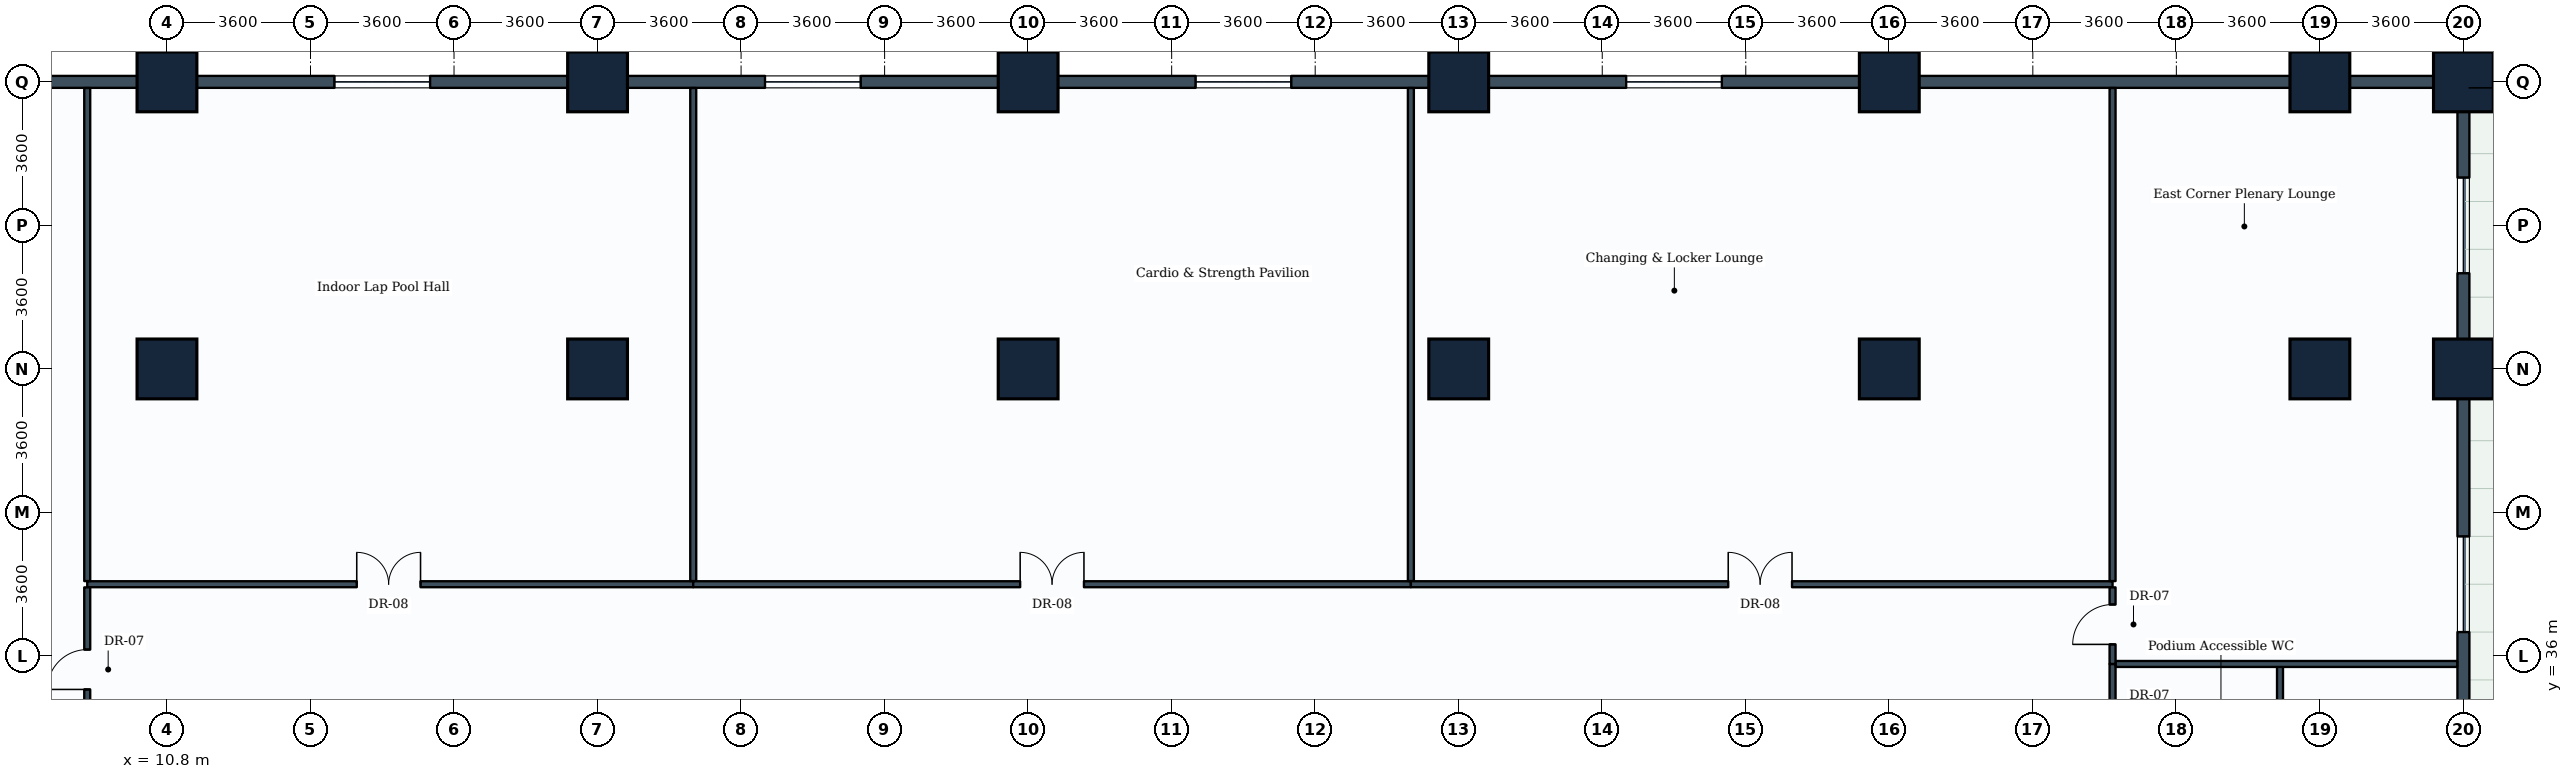
"""IFC4 building model, lengths in metres.
Left out: names, types, materials, properties, quantities, classifications, styles, units other than length and angle.
Written with IfcOpenShell. Run it as: python <this file> out.ifc"""

import sys

from ifc_helpers import new_model, si_unit, direction, frame, frame_2d, origin, origin_2d, place, context, subcontext, project, spatial, rectangle, extrude, element, fill, save


model = new_model("IFC4")
c1 = context("Model", 3, precision=1e-05, world=origin(), true_north=direction((0.0, 1.0)))
c2 = subcontext(c1, "Body", "Model", "MODEL_VIEW")
j1 = project(units=[si_unit("LENGTHUNIT", "METRE"), si_unit("PLANEANGLEUNIT", "RADIAN")], contexts=[c1])
p1 = place(None, origin())
s1 = spatial("IfcSite", under=j1, at=p1, CompositionType="ELEMENT")
p2 = place(p1, origin())
s2 = spatial("IfcBuilding", under=s1, at=p2, CompositionType="ELEMENT")
p3 = place(p2, frame((0.0, 0.0, 19.4)))
s3 = spatial("IfcBuildingStorey", under=s2, at=p3, CompositionType="ELEMENT", Elevation=19.4)
for number, where, z_axis, x_axis in (
    (1, (10.8, 43.2, 0.0), (0.0, 0.0, 1.0), (1.0, 0.0, 0.0)),
    (2, (10.8, 50.4, 0.0), (0.0, 0.0, 1.0), (1.0, 0.0, 0.0)),
    (3, (21.6, 43.2, 0.0), (0.0, 0.0, 1.0), (1.0, 0.0, 0.0)),
    (4, (21.6, 50.4, 0.0), (0.0, 0.0, 1.0), (1.0, 0.0, 0.0)),
    (5, (32.4, 43.2, 0.0), (0.0, 0.0, 1.0), (1.0, 0.0, 0.0)),
    (6, (32.4, 50.4, 0.0), (0.0, 0.0, 1.0), (1.0, 0.0, 0.0)),
    (7, (43.2, 43.2, 0.0), (0.0, 0.0, 1.0), (1.0, 0.0, 0.0)),
    (8, (43.2, 50.4, 0.0), (0.0, 0.0, 1.0), (1.0, 0.0, 0.0)),
    (9, (54.0, 43.2, 0.0), (0.0, 0.0, 1.0), (1.0, 0.0, 0.0)),
    (10, (54.0, 50.4, 0.0), (0.0, 0.0, 1.0), (1.0, 0.0, 0.0)),
    (11, (64.8, 43.2, 0.0), (0.0, 0.0, 1.0), (1.0, 0.0, 0.0)),
    (12, (64.8, 50.4, 0.0), (0.0, 0.0, 1.0), (1.0, 0.0, 0.0)),
    (13, (68.4, 43.2, 0.0), (0.0, 0.0, 1.0), (1.0, 0.0, 0.0)),
    (14, (68.4, 50.4, 0.0), (0.0, 0.0, 1.0), (1.0, 0.0, 0.0)),
):
    element("IfcColumn", number, at=place(p3, frame(where, z_axis=z_axis, x_axis=x_axis)), inside=s3, PredefinedType="COLUMN", context=c2, shape_type="SweptSolid", body=[
        extrude(rectangle(XDim=1.5, YDim=1.5, at=origin_2d()), origin(), (0.0, 0.0, 1.0), 4.6),
    ])
p4 = place(p3, frame((68.4, 43.2, 0.0), z_axis=(0.0, 0.0, 1.0), x_axis=(0.0, -1.0, 0.0)))
e15 = element("IfcWall", 15, at=p4, inside=s3, PredefinedType="STANDARD", context=c2, shape_type="SweptSolid", body=[
    extrude(rectangle(XDim=10.8, YDim=0.3, at=frame_2d((5.4, 0.0))), origin(), (0.0, 0.0, 1.0), 4.185),
])
p5 = place(p4, frame((4.2, 0.0, 0.85)))
e16 = element("IfcOpeningElement", 16, at=p5, cuts=e15, PredefinedType="OPENING", context=c2, shape_type="SweptSolid", body=[
    extrude(rectangle(XDim=2.4, YDim=1.6, at=frame_2d((1.2, 0.8))), frame((0.0, 0.16, 0.0), z_axis=(0.0, -1.0, 0.0), x_axis=(1.0, 0.0, 0.0)), (0.0, 0.0, 1.0), 0.32),
])
p6 = place(p3, frame((68.4, 50.4, 0.0), z_axis=(0.0, 0.0, 1.0), x_axis=(0.0, -1.0, 0.0)))
e17 = element("IfcWall", 17, at=p6, inside=s3, PredefinedType="STANDARD", context=c2, shape_type="SweptSolid", body=[
    extrude(rectangle(XDim=7.2, YDim=0.3, at=frame_2d((3.6, 0.0))), origin(), (0.0, 0.0, 1.0), 4.185),
])
p7 = place(p6, frame((2.4, 0.0, 0.85)))
e18 = element("IfcOpeningElement", 18, at=p7, cuts=e17, PredefinedType="OPENING", context=c2, shape_type="SweptSolid", body=[
    extrude(rectangle(XDim=2.4, YDim=1.6, at=frame_2d((1.2, 0.8))), frame((0.0, 0.16, 0.0), z_axis=(0.0, -1.0, 0.0), x_axis=(1.0, 0.0, 0.0)), (0.0, 0.0, 1.0), 0.32),
])
p8 = place(p3, frame((0.0, 50.4, 0.0), z_axis=(0.0, 0.0, 1.0), x_axis=(1.0, 0.0, 0.0)))
e19 = element("IfcWall", 19, at=p8, inside=s3, PredefinedType="STANDARD", context=c2, shape_type="SweptSolid", body=[
    extrude(rectangle(XDim=10.8, YDim=0.3, at=frame_2d((5.4, 0.0))), origin(), (0.0, 0.0, 1.0), 3.23),
])
p9 = place(p8, frame((4.2, 0.0, 0.85)))
e20 = element("IfcOpeningElement", 20, at=p9, cuts=e19, PredefinedType="OPENING", context=c2, shape_type="SweptSolid", body=[
    extrude(rectangle(XDim=2.4, YDim=1.6, at=frame_2d((1.2, 0.8))), frame((0.0, 0.16, 0.0), z_axis=(0.0, -1.0, 0.0), x_axis=(1.0, 0.0, 0.0)), (0.0, 0.0, 1.0), 0.32),
])
p10 = place(p3, frame((10.8, 50.4, 0.0), z_axis=(0.0, 0.0, 1.0), x_axis=(1.0, 0.0, 0.0)))
e21 = element("IfcWall", 21, at=p10, inside=s3, PredefinedType="STANDARD", context=c2, shape_type="SweptSolid", body=[
    extrude(rectangle(XDim=10.8, YDim=0.3, at=frame_2d((5.4, 0.0))), origin(), (0.0, 0.0, 1.0), 3.23),
])
p11 = place(p10, frame((4.2, 0.0, 0.85)))
e22 = element("IfcOpeningElement", 22, at=p11, cuts=e21, PredefinedType="OPENING", context=c2, shape_type="SweptSolid", body=[
    extrude(rectangle(XDim=2.4, YDim=1.6, at=frame_2d((1.2, 0.8))), frame((0.0, 0.16, 0.0), z_axis=(0.0, -1.0, 0.0), x_axis=(1.0, 0.0, 0.0)), (0.0, 0.0, 1.0), 0.32),
])
p12 = place(p3, frame((21.6, 50.4, 0.0), z_axis=(0.0, 0.0, 1.0), x_axis=(1.0, 0.0, 0.0)))
e23 = element("IfcWall", 23, at=p12, inside=s3, PredefinedType="STANDARD", context=c2, shape_type="SweptSolid", body=[
    extrude(rectangle(XDim=10.8, YDim=0.3, at=frame_2d((5.4, 0.0))), origin(), (0.0, 0.0, 1.0), 3.23),
])
p13 = place(p12, frame((4.2, 0.0, 0.85)))
e24 = element("IfcOpeningElement", 24, at=p13, cuts=e23, PredefinedType="OPENING", context=c2, shape_type="SweptSolid", body=[
    extrude(rectangle(XDim=2.4, YDim=1.6, at=frame_2d((1.2, 0.8))), frame((0.0, 0.16, 0.0), z_axis=(0.0, -1.0, 0.0), x_axis=(1.0, 0.0, 0.0)), (0.0, 0.0, 1.0), 0.32),
])
p14 = place(p3, frame((32.4, 50.4, 0.0), z_axis=(0.0, 0.0, 1.0), x_axis=(1.0, 0.0, 0.0)))
e25 = element("IfcWall", 25, at=p14, inside=s3, PredefinedType="STANDARD", context=c2, shape_type="SweptSolid", body=[
    extrude(rectangle(XDim=10.8, YDim=0.3, at=frame_2d((5.4, 0.0))), origin(), (0.0, 0.0, 1.0), 3.23),
])
p15 = place(p14, frame((4.2, 0.0, 0.85)))
e26 = element("IfcOpeningElement", 26, at=p15, cuts=e25, PredefinedType="OPENING", context=c2, shape_type="SweptSolid", body=[
    extrude(rectangle(XDim=2.4, YDim=1.6, at=frame_2d((1.2, 0.8))), frame((0.0, 0.16, 0.0), z_axis=(0.0, -1.0, 0.0), x_axis=(1.0, 0.0, 0.0)), (0.0, 0.0, 1.0), 0.32),
])
p16 = place(p3, frame((43.2, 50.4, 0.0), z_axis=(0.0, 0.0, 1.0), x_axis=(1.0, 0.0, 0.0)))
e27 = element("IfcWall", 27, at=p16, inside=s3, PredefinedType="STANDARD", context=c2, shape_type="SweptSolid", body=[
    extrude(rectangle(XDim=10.8, YDim=0.3, at=frame_2d((5.4, 0.0))), origin(), (0.0, 0.0, 1.0), 4.185),
])
p17 = place(p16, frame((4.2, 0.0, 0.85)))
e28 = element("IfcOpeningElement", 28, at=p17, cuts=e27, PredefinedType="OPENING", context=c2, shape_type="SweptSolid", body=[
    extrude(rectangle(XDim=2.4, YDim=1.6, at=frame_2d((1.2, 0.8))), frame((0.0, 0.16, 0.0), z_axis=(0.0, -1.0, 0.0), x_axis=(1.0, 0.0, 0.0)), (0.0, 0.0, 1.0), 0.32),
])
p18 = place(p3, frame((54.0, 50.4, 0.0), z_axis=(0.0, 0.0, 1.0), x_axis=(1.0, 0.0, 0.0)))
e29 = element("IfcWall", 29, at=p18, inside=s3, PredefinedType="STANDARD", context=c2, shape_type="SweptSolid", body=[
    extrude(rectangle(XDim=10.8, YDim=0.3, at=frame_2d((5.4, 0.0))), origin(), (0.0, 0.0, 1.0), 4.185),
])
p19 = place(p3, frame((64.8, 50.4, 0.0), z_axis=(0.0, 0.0, 1.0), x_axis=(1.0, 0.0, 0.0)))
e30 = element("IfcWall", 30, at=p19, inside=s3, PredefinedType="STANDARD", context=c2, shape_type="SweptSolid", body=[
    extrude(rectangle(XDim=3.6, YDim=0.3, at=frame_2d((1.8, 0.0))), origin(), (0.0, 0.0, 1.0), 4.185),
])
p20 = place(p3, frame((8.8, 37.8, 0.0), z_axis=(0.0, 0.0, 1.0), x_axis=(1.0, 0.0, 0.0)))
e31 = element("IfcWall", 31, at=p20, inside=s3, PredefinedType="PARTITIONING", context=c2, shape_type="SweptSolid", body=[
    extrude(rectangle(XDim=15.2, YDim=0.15, at=frame_2d((7.6, 0.0))), origin(), (0.0, 0.0, 1.0), 3.23),
])
p21 = place(p20, frame((6.76, 0.0, 0.0)))
e32 = element("IfcOpeningElement", 32, at=p21, cuts=e31, PredefinedType="OPENING", context=c2, shape_type="SweptSolid", body=[
    extrude(rectangle(XDim=1.6, YDim=2.2, at=frame_2d((0.8, 1.1))), frame((0.0, 0.085, 0.0), z_axis=(0.0, -1.0, 0.0), x_axis=(1.0, 0.0, 0.0)), (0.0, 0.0, 1.0), 0.17),
])
p22 = place(p3, frame((24.0, 37.879, 0.0), z_axis=(0.0, 0.0, 1.0), x_axis=(0.0, 1.0, 0.0)))
e33 = element("IfcWall", 33, at=p22, inside=s3, PredefinedType="PARTITIONING", context=c2, shape_type="SweptSolid", body=[
    extrude(rectangle(XDim=12.367, YDim=0.15, at=frame_2d((6.184, 0.0))), origin(), (0.0, 0.0, 1.0), 3.23),
])
p23 = place(p3, frame((24.0, 37.8, 0.0), z_axis=(0.0, 0.0, 1.0), x_axis=(1.0, 0.0, 0.0)))
e34 = element("IfcWall", 34, at=p23, inside=s3, PredefinedType="PARTITIONING", context=c2, shape_type="SweptSolid", body=[
    extrude(rectangle(XDim=18.0, YDim=0.15, at=frame_2d((9.0, 0.0))), origin(), (0.0, 0.0, 1.0), 3.23),
])
p24 = place(p23, frame((8.2, 0.0, 0.0)))
e35 = element("IfcOpeningElement", 35, at=p24, cuts=e34, PredefinedType="OPENING", context=c2, shape_type="SweptSolid", body=[
    extrude(rectangle(XDim=1.6, YDim=2.2, at=frame_2d((0.8, 1.1))), frame((0.0, 0.085, 0.0), z_axis=(0.0, -1.0, 0.0), x_axis=(1.0, 0.0, 0.0)), (0.0, 0.0, 1.0), 0.17),
])
p25 = place(p3, frame((42.0, 37.879, 0.0), z_axis=(0.0, 0.0, 1.0), x_axis=(0.0, 1.0, 0.0)))
e36 = element("IfcWall", 36, at=p25, inside=s3, PredefinedType="PARTITIONING", context=c2, shape_type="SweptSolid", body=[
    extrude(rectangle(XDim=12.367, YDim=0.15, at=frame_2d((6.184, 0.0))), origin(), (0.0, 0.0, 1.0), 4.185),
])
p26 = place(p3, frame((42.0, 37.8, 0.0), z_axis=(0.0, 0.0, 1.0), x_axis=(1.0, 0.0, 0.0)))
e37 = element("IfcWall", 37, at=p26, inside=s3, PredefinedType="PARTITIONING", context=c2, shape_type="SweptSolid", body=[
    extrude(rectangle(XDim=17.6, YDim=0.15, at=frame_2d((8.8, 0.0))), origin(), (0.0, 0.0, 1.0), 4.185),
])
p27 = place(p26, frame((7.96, 0.0, 0.0)))
e38 = element("IfcOpeningElement", 38, at=p27, cuts=e37, PredefinedType="OPENING", context=c2, shape_type="SweptSolid", body=[
    extrude(rectangle(XDim=1.6, YDim=2.2, at=frame_2d((0.8, 1.1))), frame((0.0, 0.085, 0.0), z_axis=(0.0, -1.0, 0.0), x_axis=(1.0, 0.0, 0.0)), (0.0, 0.0, 1.0), 0.17),
])
p28 = place(p3, frame((8.8, 33.6, 0.0), z_axis=(0.0, 0.0, 1.0), x_axis=(0.0, 1.0, 0.0)))
e39 = element("IfcWall", 39, at=p28, inside=s3, PredefinedType="PARTITIONING", context=c2, shape_type="SweptSolid", body=[
    extrude(rectangle(XDim=4.121, YDim=0.15, at=frame_2d((2.061, 0.0))), origin(), (0.0, 0.0, 1.0), 3.59),
])
p29 = place(p28, frame((1.561, 0.0, 0.0)))
e40 = element("IfcOpeningElement", 40, at=p29, cuts=e39, PredefinedType="OPENING", context=c2, shape_type="SweptSolid", body=[
    extrude(rectangle(XDim=1.0, YDim=2.1, at=frame_2d((0.5, 1.05))), frame((0.0, 0.085, 0.0), z_axis=(0.0, -1.0, 0.0), x_axis=(1.0, 0.0, 0.0)), (0.0, 0.0, 1.0), 0.17),
])
p30 = place(p3, frame((8.8, 37.879, 0.0), z_axis=(0.0, 0.0, 1.0), x_axis=(0.0, 1.0, 0.0)))
e41 = element("IfcWall", 41, at=p30, inside=s3, PredefinedType="PARTITIONING", context=c2, shape_type="SweptSolid", body=[
    extrude(rectangle(XDim=12.367, YDim=0.15, at=frame_2d((6.184, 0.0))), origin(), (0.0, 0.0, 1.0), 3.23),
])
p31 = place(p3, frame((63.8, 32.879, 0.0), z_axis=(0.0, 0.0, 1.0), x_axis=(0.0, 1.0, 0.0)))
e42 = element("IfcWall", 42, at=p31, inside=s3, PredefinedType="PARTITIONING", context=c2, shape_type="SweptSolid", body=[
    extrude(rectangle(XDim=2.921, YDim=0.15, at=frame_2d((1.46, 0.0))), origin(), (0.0, 0.0, 1.0), 4.185),
])
p32 = place(p3, frame((59.6, 32.8, 0.0), z_axis=(0.0, 0.0, 1.0), x_axis=(0.0, 1.0, 0.0)))
e43 = element("IfcWall", 43, at=p32, inside=s3, PredefinedType="PARTITIONING", context=c2, shape_type="SweptSolid", body=[
    extrude(rectangle(XDim=3.0, YDim=0.15, at=frame_2d((1.5, 0.0))), origin(), (0.0, 0.0, 1.0), 4.185),
])
p33 = place(p32, frame((1.0, 0.0, 0.0)))
e44 = element("IfcOpeningElement", 44, at=p33, cuts=e43, PredefinedType="OPENING", context=c2, shape_type="SweptSolid", body=[
    extrude(rectangle(XDim=1.0, YDim=2.1, at=frame_2d((0.5, 1.05))), frame((0.0, 0.085, 0.0), z_axis=(0.0, -1.0, 0.0), x_axis=(1.0, 0.0, 0.0)), (0.0, 0.0, 1.0), 0.17),
])
p34 = place(p3, frame((59.679, 35.8, 0.0), z_axis=(0.0, 0.0, 1.0), x_axis=(1.0, 0.0, 0.0)))
e45 = element("IfcWall", 45, at=p34, inside=s3, PredefinedType="PARTITIONING", context=c2, shape_type="SweptSolid", body=[
    extrude(rectangle(XDim=8.567, YDim=0.15, at=frame_2d((4.284, 0.0))), origin(), (0.0, 0.0, 1.0), 4.185),
])
p35 = place(p3, frame((59.6, 35.8, 0.0), z_axis=(0.0, 0.0, 1.0), x_axis=(0.0, 1.0, 0.0)))
e46 = element("IfcWall", 46, at=p35, inside=s3, PredefinedType="PARTITIONING", context=c2, shape_type="SweptSolid", body=[
    extrude(rectangle(XDim=1.921, YDim=0.15, at=frame_2d((0.96, 0.0))), origin(), (0.0, 0.0, 1.0), 4.185),
])
p36 = place(p35, frame((0.491, 0.0, 0.0)))
e47 = element("IfcOpeningElement", 47, at=p36, cuts=e46, PredefinedType="OPENING", context=c2, shape_type="SweptSolid", body=[
    extrude(rectangle(XDim=1.0, YDim=2.1, at=frame_2d((0.5, 1.05))), frame((0.0, 0.085, 0.0), z_axis=(0.0, -1.0, 0.0), x_axis=(1.0, 0.0, 0.0)), (0.0, 0.0, 1.0), 0.17),
])
p37 = place(p3, frame((59.6, 37.879, 0.0), z_axis=(0.0, 0.0, 1.0), x_axis=(0.0, 1.0, 0.0)))
e48 = element("IfcWall", 48, at=p37, inside=s3, PredefinedType="PARTITIONING", context=c2, shape_type="SweptSolid", body=[
    extrude(rectangle(XDim=12.367, YDim=0.15, at=frame_2d((6.184, 0.0))), origin(), (0.0, 0.0, 1.0), 4.185),
])
p38 = place(p5, origin())
e49 = element("IfcWindow", 49, at=p38, inside=s3, PartitioningType="SINGLE_PANEL", PredefinedType="WINDOW", context=c2, shape_type="SweptSolid", body=[
    extrude(rectangle(XDim=2.4, YDim=1.6, at=frame_2d((1.2, 0.8))), frame((0.0, 0.03, 0.0), z_axis=(0.0, -1.0, 0.0), x_axis=(1.0, 0.0, 0.0)), (0.0, 0.0, 1.0), 0.06),
])
fill(e16, e49)
p39 = place(p7, origin())
e50 = element("IfcWindow", 50, at=p39, inside=s3, PartitioningType="SINGLE_PANEL", PredefinedType="WINDOW", context=c2, shape_type="SweptSolid", body=[
    extrude(rectangle(XDim=2.4, YDim=1.6, at=frame_2d((1.2, 0.8))), frame((0.0, 0.03, 0.0), z_axis=(0.0, -1.0, 0.0), x_axis=(1.0, 0.0, 0.0)), (0.0, 0.0, 1.0), 0.06),
])
fill(e18, e50)
p40 = place(p11, origin())
e51 = element("IfcWindow", 51, at=p40, inside=s3, PartitioningType="SINGLE_PANEL", PredefinedType="WINDOW", context=c2, shape_type="SweptSolid", body=[
    extrude(rectangle(XDim=2.4, YDim=1.6, at=frame_2d((1.2, 0.8))), frame((0.0, 0.03, 0.0), z_axis=(0.0, -1.0, 0.0), x_axis=(1.0, 0.0, 0.0)), (0.0, 0.0, 1.0), 0.06),
])
fill(e22, e51)
p41 = place(p13, origin())
e52 = element("IfcWindow", 52, at=p41, inside=s3, PartitioningType="SINGLE_PANEL", PredefinedType="WINDOW", context=c2, shape_type="SweptSolid", body=[
    extrude(rectangle(XDim=2.4, YDim=1.6, at=frame_2d((1.2, 0.8))), frame((0.0, 0.03, 0.0), z_axis=(0.0, -1.0, 0.0), x_axis=(1.0, 0.0, 0.0)), (0.0, 0.0, 1.0), 0.06),
])
fill(e24, e52)
p42 = place(p15, origin())
e53 = element("IfcWindow", 53, at=p42, inside=s3, PartitioningType="SINGLE_PANEL", PredefinedType="WINDOW", context=c2, shape_type="SweptSolid", body=[
    extrude(rectangle(XDim=2.4, YDim=1.6, at=frame_2d((1.2, 0.8))), frame((0.0, 0.03, 0.0), z_axis=(0.0, -1.0, 0.0), x_axis=(1.0, 0.0, 0.0)), (0.0, 0.0, 1.0), 0.06),
])
fill(e26, e53)
p43 = place(p17, origin())
e54 = element("IfcWindow", 54, at=p43, inside=s3, PartitioningType="SINGLE_PANEL", PredefinedType="WINDOW", context=c2, shape_type="SweptSolid", body=[
    extrude(rectangle(XDim=2.4, YDim=1.6, at=frame_2d((1.2, 0.8))), frame((0.0, 0.03, 0.0), z_axis=(0.0, -1.0, 0.0), x_axis=(1.0, 0.0, 0.0)), (0.0, 0.0, 1.0), 0.06),
])
fill(e28, e54)
p44 = place(p21, origin())
e55 = element("IfcDoor", 55, at=p44, inside=s3, OperationType="DOUBLE_DOOR_SINGLE_SWING", PredefinedType="DOOR", context=c2, shape_type="SweptSolid", body=[
    extrude(rectangle(XDim=1.6, YDim=2.2, at=frame_2d((0.8, 1.1))), frame((0.0, 0.025, 0.0), z_axis=(0.0, -1.0, 0.0), x_axis=(1.0, 0.0, 0.0)), (0.0, 0.0, 1.0), 0.05),
])
fill(e32, e55)
p45 = place(p24, origin())
e56 = element("IfcDoor", 56, at=p45, inside=s3, OperationType="DOUBLE_DOOR_SINGLE_SWING", PredefinedType="DOOR", context=c2, shape_type="SweptSolid", body=[
    extrude(rectangle(XDim=1.6, YDim=2.2, at=frame_2d((0.8, 1.1))), frame((0.0, 0.025, 0.0), z_axis=(0.0, -1.0, 0.0), x_axis=(1.0, 0.0, 0.0)), (0.0, 0.0, 1.0), 0.05),
])
fill(e35, e56)
p46 = place(p27, origin())
e57 = element("IfcDoor", 57, at=p46, inside=s3, OperationType="DOUBLE_DOOR_SINGLE_SWING", PredefinedType="DOOR", context=c2, shape_type="SweptSolid", body=[
    extrude(rectangle(XDim=1.6, YDim=2.2, at=frame_2d((0.8, 1.1))), frame((0.0, 0.025, 0.0), z_axis=(0.0, -1.0, 0.0), x_axis=(1.0, 0.0, 0.0)), (0.0, 0.0, 1.0), 0.05),
])
fill(e38, e57)
p47 = place(p29, origin())
e58 = element("IfcDoor", 58, at=p47, inside=s3, OperationType="SINGLE_SWING_LEFT", PredefinedType="DOOR", context=c2, shape_type="SweptSolid", body=[
    extrude(rectangle(XDim=1.0, YDim=2.1, at=frame_2d((0.5, 1.05))), frame((0.0, 0.025, 0.0), z_axis=(0.0, -1.0, 0.0), x_axis=(1.0, 0.0, 0.0)), (0.0, 0.0, 1.0), 0.05),
])
fill(e40, e58)
p48 = place(p36, origin())
e59 = element("IfcDoor", 59, at=p48, inside=s3, OperationType="SINGLE_SWING_LEFT", PredefinedType="DOOR", context=c2, shape_type="SweptSolid", body=[
    extrude(rectangle(XDim=1.0, YDim=2.1, at=frame_2d((0.5, 1.05))), frame((0.0, 0.025, 0.0), z_axis=(0.0, -1.0, 0.0), x_axis=(1.0, 0.0, 0.0)), (0.0, 0.0, 1.0), 0.05),
])
fill(e47, e59)
save(model, sys.argv[1])
